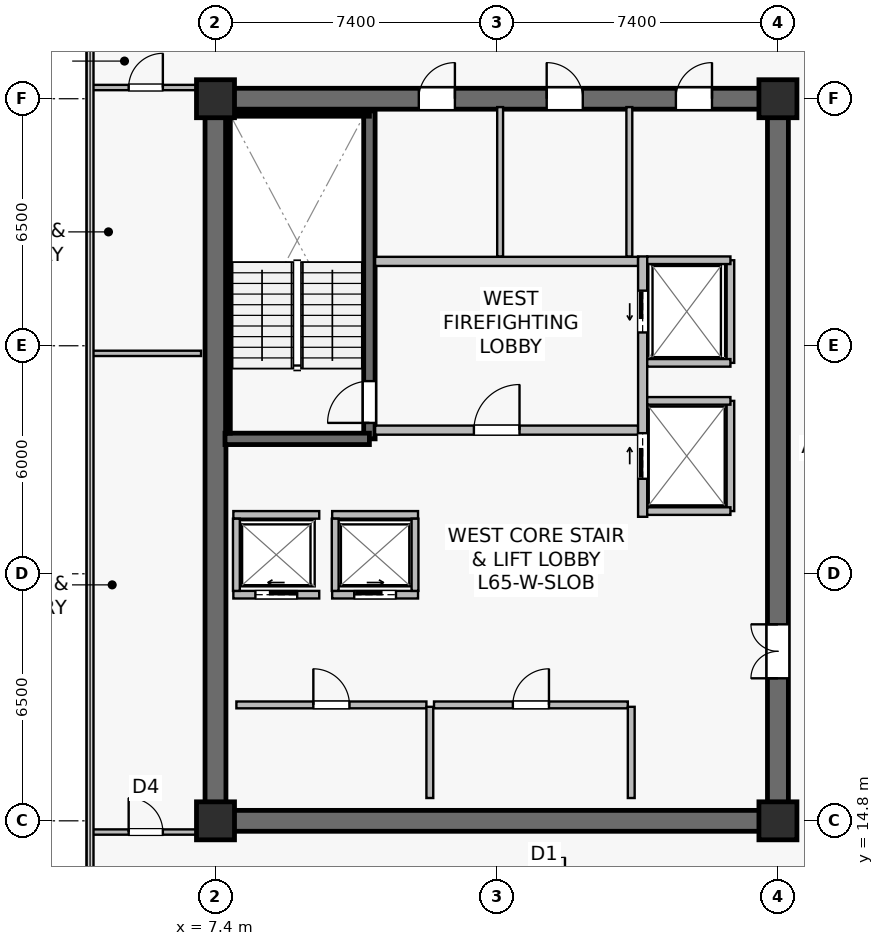
"""IFC4 building model, lengths in metres.
Left out: names, types, materials, properties, quantities, classifications, styles, units other than length and angle.
Written with IfcOpenShell. Run it as: python <this file> out.ifc"""

import sys

from ifc_helpers import new_model, si_unit, direction, frame, frame_2d, origin, origin_2d, place, context, subcontext, project, spatial, rectangle, extrude, source, transform, mapped, element, fill, save


model = new_model("IFC4")
c1 = context("Model", 3, precision=1e-05, world=origin(), true_north=direction((0.0, 1.0)))
c2 = subcontext(c1, "Body", "Model", "MODEL_VIEW")
j1 = project(units=[si_unit("LENGTHUNIT", "METRE"), si_unit("PLANEANGLEUNIT", "RADIAN")], contexts=[c1])
p1 = place(None, origin())
s1 = spatial("IfcSite", under=j1, at=p1, CompositionType="ELEMENT")
p2 = place(p1, origin())
s2 = spatial("IfcBuilding", under=s1, at=p2, CompositionType="ELEMENT")
p3 = place(p2, frame((0.0, 0.0, 271.1)))
s3 = spatial("IfcBuildingStorey", under=s2, at=p3, CompositionType="ELEMENT", Elevation=271.1)
p4 = place(p3, frame((7.125, 14.8, 0.0), z_axis=(0.0, 0.0, 1.0), x_axis=(1.0, 0.0, 0.0)))
e1 = element("IfcWall", 1, at=p4, inside=s3, PredefinedType="SHEAR", context=c2, shape_type="SweptSolid", body=[
    extrude(rectangle(XDim=15.35, YDim=0.55, at=frame_2d((7.675, 0.0))), origin(), (0.0, 0.0, 1.0), 3.8),
])
p5 = place(p3, frame((7.125, 33.8, 0.0), z_axis=(0.0, 0.0, 1.0), x_axis=(1.0, 0.0, 0.0)))
e2 = element("IfcWall", 2, at=p5, inside=s3, PredefinedType="SHEAR", context=c2, shape_type="SweptSolid", body=[
    extrude(rectangle(XDim=15.35, YDim=0.55, at=frame_2d((7.675, 0.0))), origin(), (0.0, 0.0, 1.0), 3.8),
])
p6 = place(p5, frame((5.625, 0.0, 0.0)))
e3 = element("IfcOpeningElement", 3, at=p6, cuts=e2, PredefinedType="OPENING", context=c2, shape_type="SweptSolid", body=[
    extrude(rectangle(XDim=0.95, YDim=2.15, at=frame_2d((0.475, 1.075))), frame((0.0, 0.285, 0.0), z_axis=(0.0, -1.0, 0.0), x_axis=(1.0, 0.0, 0.0)), (0.0, 0.0, 1.0), 0.57),
])
p7 = place(p5, frame((8.99, 0.0, 0.0)))
e4 = element("IfcOpeningElement", 4, at=p7, cuts=e2, PredefinedType="OPENING", context=c2, shape_type="SweptSolid", body=[
    extrude(rectangle(XDim=0.95, YDim=2.15, at=frame_2d((0.475, 1.075))), frame((0.0, 0.285, 0.0), z_axis=(0.0, -1.0, 0.0), x_axis=(1.0, 0.0, 0.0)), (0.0, 0.0, 1.0), 0.57),
])
p8 = place(p5, frame((12.39, 0.0, 0.0)))
e5 = element("IfcOpeningElement", 5, at=p8, cuts=e2, PredefinedType="OPENING", context=c2, shape_type="SweptSolid", body=[
    extrude(rectangle(XDim=0.95, YDim=2.15, at=frame_2d((0.475, 1.075))), frame((0.0, 0.285, 0.0), z_axis=(0.0, -1.0, 0.0), x_axis=(1.0, 0.0, 0.0)), (0.0, 0.0, 1.0), 0.57),
])
p9 = place(p3, frame((7.4, 15.075, 0.0), z_axis=(0.0, 0.0, 1.0), x_axis=(0.0, 1.0, 0.0)))
e6 = element("IfcWall", 6, at=p9, inside=s3, PredefinedType="SHEAR", context=c2, shape_type="SweptSolid", body=[
    extrude(rectangle(XDim=18.45, YDim=0.55, at=frame_2d((9.225, 0.0))), origin(), (0.0, 0.0, 1.0), 3.8),
])
p10 = place(p3, frame((22.2, 15.075, 0.0), z_axis=(0.0, 0.0, 1.0), x_axis=(0.0, 1.0, 0.0)))
e7 = element("IfcWall", 7, at=p10, inside=s3, PredefinedType="SHEAR", context=c2, shape_type="SweptSolid", body=[
    extrude(rectangle(XDim=18.45, YDim=0.55, at=frame_2d((9.225, 0.0))), origin(), (0.0, 0.0, 1.0), 3.8),
])
p11 = place(p10, frame((3.475, 0.0, 0.0)))
e8 = element("IfcOpeningElement", 8, at=p11, cuts=e7, PredefinedType="OPENING", context=c2, shape_type="SweptSolid", body=[
    extrude(rectangle(XDim=1.42, YDim=2.2, at=frame_2d((0.71, 1.1))), frame((0.0, 0.285, 0.0), z_axis=(0.0, -1.0, 0.0), x_axis=(1.0, 0.0, 0.0)), (0.0, 0.0, 1.0), 0.57),
])
p12 = place(p3, frame((11.45, 24.85, 0.0), z_axis=(0.0, 0.0, 1.0), x_axis=(0.0, 1.0, 0.0)))
e9 = element("IfcWall", 9, at=p12, inside=s3, PredefinedType="SHEAR", context=c2, shape_type="SweptSolid", body=[
    extrude(rectangle(XDim=8.63, YDim=0.3, at=frame_2d((4.315, 0.0))), origin(), (0.0, 0.0, 1.0), 3.8),
])
p13 = place(p12, frame((0.42, 0.0, 0.0)))
e10 = element("IfcOpeningElement", 10, at=p13, cuts=e9, PredefinedType="OPENING", context=c2, shape_type="SweptSolid", body=[
    extrude(rectangle(XDim=1.1, YDim=2.15, at=frame_2d((0.55, 1.075))), frame((0.0, 0.16, 0.0), z_axis=(0.0, -1.0, 0.0), x_axis=(1.0, 0.0, 0.0)), (0.0, 0.0, 1.0), 0.32),
])
p14 = place(p3, frame((7.65, 24.85, 0.0), z_axis=(0.0, 0.0, 1.0), x_axis=(1.0, 0.0, 0.0)))
e11 = element("IfcWall", 11, at=p14, inside=s3, PredefinedType="SHEAR", context=c2, shape_type="SweptSolid", body=[
    extrude(rectangle(XDim=3.8, YDim=0.3, at=frame_2d((1.9, 0.0))), origin(), (0.0, 0.0, 1.0), 3.8),
])
p15 = place(p3, frame((7.73, 33.4, 0.0), z_axis=(0.0, 0.0, 1.0), x_axis=(1.0, 0.0, 0.0)))
e12 = element("IfcWall", 12, at=p15, inside=s3, PredefinedType="SOLIDWALL", context=c2, shape_type="SweptSolid", body=[
    extrude(rectangle(XDim=3.72, YDim=0.12, at=frame_2d((1.86, 0.0))), origin(), (0.0, 0.0, 1.0), 3.8),
])
p16 = place(p3, frame((7.73, 25.0, 0.0), z_axis=(0.0, 0.0, 1.0), x_axis=(0.0, 1.0, 0.0)))
e13 = element("IfcWall", 13, at=p16, inside=s3, PredefinedType="SOLIDWALL", context=c2, shape_type="SweptSolid", body=[
    extrude(rectangle(XDim=8.32, YDim=0.12, at=frame_2d((4.16, 0.0))), origin(), (0.0, 0.0, 1.0), 3.8),
])
m1 = source(origin(), c2, "Body", "SweptSolid", [
    extrude(rectangle(XDim=1.0, YDim=1.0, at=origin_2d()), origin(), (0.0, 0.0, 1.0), 4.1),
])
for number, where, z_axis, x_axis in (
    (14, (7.4, 14.8, 0.0), (0.0, 0.0, 1.0), (1.0, 0.0, 0.0)),
    (15, (22.2, 14.8, 0.0), (0.0, 0.0, 1.0), (1.0, 0.0, 0.0)),
    (16, (7.4, 33.8, 0.0), (0.0, 0.0, 1.0), (1.0, 0.0, 0.0)),
    (17, (22.2, 33.8, 0.0), (0.0, 0.0, 1.0), (1.0, 0.0, 0.0)),
):
    element("IfcColumn", number, at=place(p3, frame(where, z_axis=z_axis, x_axis=x_axis)), inside=s3, PredefinedType="COLUMN", context=c2, shape_type="MappedRepresentation", body=[
        mapped(m1, transform((0.0, 0.0, 0.0), scale=1.0)),
    ])
p17 = place(p3, frame((11.6, 25.08, 0.0), z_axis=(0.0, 0.0, 1.0), x_axis=(1.0, 0.0, 0.0)))
e18 = element("IfcWall", 18, at=p17, inside=s3, PredefinedType="SOLIDWALL", context=c2, shape_type="SweptSolid", body=[
    extrude(rectangle(XDim=6.92, YDim=0.24, at=frame_2d((3.46, 0.0))), origin(), (0.0, 0.0, 1.0), 3.197),
])
p18 = place(p17, frame((2.6, 0.0, 0.0)))
e19 = element("IfcOpeningElement", 19, at=p18, cuts=e18, PredefinedType="OPENING", context=c2, shape_type="SweptSolid", body=[
    extrude(rectangle(XDim=1.2, YDim=2.16, at=frame_2d((0.6, 1.08))), frame((0.0, 0.13, 0.0), z_axis=(0.0, -1.0, 0.0), x_axis=(1.0, 0.0, 0.0)), (0.0, 0.0, 1.0), 0.26),
])
p19 = place(p3, frame((11.6, 29.52, 0.0), z_axis=(0.0, 0.0, 1.0), x_axis=(1.0, 0.0, 0.0)))
e20 = element("IfcWall", 20, at=p19, inside=s3, PredefinedType="SOLIDWALL", context=c2, shape_type="SweptSolid", body=[
    extrude(rectangle(XDim=6.92, YDim=0.24, at=frame_2d((3.46, 0.0))), origin(), (0.0, 0.0, 1.0), 3.197),
])
p20 = place(p3, frame((18.64, 22.8, 0.0), z_axis=(0.0, 0.0, 1.0), x_axis=(0.0, 1.0, 0.0)))
e21 = element("IfcWall", 21, at=p20, inside=s3, PredefinedType="SOLIDWALL", context=c2, shape_type="SweptSolid", body=[
    extrude(rectangle(XDim=6.85, YDim=0.24, at=frame_2d((3.425, 0.0))), origin(), (0.0, 0.0, 1.0), 2.935),
])
p21 = place(p20, frame((4.85, 0.0, 0.0)))
e22 = element("IfcOpeningElement", 22, at=p21, cuts=e21, PredefinedType="OPENING", context=c2, shape_type="SweptSolid", body=[
    extrude(rectangle(XDim=1.1, YDim=2.22, at=frame_2d((0.55, 1.11))), frame((0.0, 0.13, 0.0), z_axis=(0.0, -1.0, 0.0), x_axis=(1.0, 0.0, 0.0)), (0.0, 0.0, 1.0), 0.26),
])
p22 = place(p20, frame((1.0, 0.0, 0.0)))
e23 = element("IfcOpeningElement", 23, at=p22, cuts=e21, PredefinedType="OPENING", context=c2, shape_type="SweptSolid", body=[
    extrude(rectangle(XDim=1.2, YDim=2.22, at=frame_2d((0.6, 1.11))), frame((0.0, 0.13, 0.0), z_axis=(0.0, -1.0, 0.0), x_axis=(1.0, 0.0, 0.0)), (0.0, 0.0, 1.0), 0.26),
])
p23 = place(p3, frame((7.87, 20.75, 0.0), z_axis=(0.0, 0.0, 1.0), x_axis=(1.0, 0.0, 0.0)))
e24 = element("IfcWall", 24, at=p23, inside=s3, PredefinedType="SOLIDWALL", context=c2, shape_type="SweptSolid", body=[
    extrude(rectangle(XDim=2.26, YDim=0.2, at=frame_2d((1.13, 0.0))), origin(), (0.0, 0.0, 1.0), 3.8),
])
p24 = place(p23, frame((0.58, 0.0, 0.0)))
e25 = element("IfcOpeningElement", 25, at=p24, cuts=e24, PredefinedType="OPENING", context=c2, shape_type="SweptSolid", body=[
    extrude(rectangle(XDim=1.1, YDim=2.22, at=frame_2d((0.55, 1.11))), frame((0.0, 0.11, 0.0), z_axis=(0.0, -1.0, 0.0), x_axis=(1.0, 0.0, 0.0)), (0.0, 0.0, 1.0), 0.22),
])
p25 = place(p3, frame((7.87, 22.85, 0.0), z_axis=(0.0, 0.0, 1.0), x_axis=(1.0, 0.0, 0.0)))
e26 = element("IfcWall", 26, at=p25, inside=s3, PredefinedType="SOLIDWALL", context=c2, shape_type="SweptSolid", body=[
    extrude(rectangle(XDim=2.26, YDim=0.2, at=frame_2d((1.13, 0.0))), origin(), (0.0, 0.0, 1.0), 3.8),
])
p26 = place(p3, frame((7.95, 20.85, 0.0), z_axis=(0.0, 0.0, 1.0), x_axis=(0.0, 1.0, 0.0)))
e27 = element("IfcWall", 27, at=p26, inside=s3, PredefinedType="SOLIDWALL", context=c2, shape_type="SweptSolid", body=[
    extrude(rectangle(XDim=1.9, YDim=0.18, at=frame_2d((0.95, 0.0))), origin(), (0.0, 0.0, 1.0), 3.8),
])
p27 = place(p3, frame((10.47, 20.75, 0.0), z_axis=(0.0, 0.0, 1.0), x_axis=(1.0, 0.0, 0.0)))
e28 = element("IfcWall", 28, at=p27, inside=s3, PredefinedType="SOLIDWALL", context=c2, shape_type="SweptSolid", body=[
    extrude(rectangle(XDim=2.26, YDim=0.2, at=frame_2d((1.13, 0.0))), origin(), (0.0, 0.0, 1.0), 3.8),
])
p28 = place(p27, frame((0.58, 0.0, 0.0)))
e29 = element("IfcOpeningElement", 29, at=p28, cuts=e28, PredefinedType="OPENING", context=c2, shape_type="SweptSolid", body=[
    extrude(rectangle(XDim=1.1, YDim=2.22, at=frame_2d((0.55, 1.11))), frame((0.0, 0.11, 0.0), z_axis=(0.0, -1.0, 0.0), x_axis=(1.0, 0.0, 0.0)), (0.0, 0.0, 1.0), 0.22),
])
p29 = place(p3, frame((10.47, 22.85, 0.0), z_axis=(0.0, 0.0, 1.0), x_axis=(1.0, 0.0, 0.0)))
e30 = element("IfcWall", 30, at=p29, inside=s3, PredefinedType="SOLIDWALL", context=c2, shape_type="SweptSolid", body=[
    extrude(rectangle(XDim=2.26, YDim=0.2, at=frame_2d((1.13, 0.0))), origin(), (0.0, 0.0, 1.0), 3.8),
])
for number, where, z_axis, x_axis in (
    (31, (10.55, 20.85, 0.0), (0.0, 0.0, 1.0), (0.0, 1.0, 0.0)),
    (32, (12.65, 20.85, 0.0), (0.0, 0.0, 1.0), (0.0, 1.0, 0.0)),
):
    element("IfcWall", number, at=place(p3, frame(where, z_axis=z_axis, x_axis=x_axis)), inside=s3, PredefinedType="SOLIDWALL", context=c2, shape_type="SweptSolid", body=[
        extrude(rectangle(XDim=1.9, YDim=0.18, at=frame_2d((0.95, 0.0))), origin(), (0.0, 0.0, 1.0), 3.8),
    ])
p30 = place(p3, frame((20.95, 26.85, 0.0), z_axis=(0.0, 0.0, 1.0), x_axis=(0.0, 1.0, 0.0)))
e33 = element("IfcWall", 33, at=p30, inside=s3, PredefinedType="SOLIDWALL", context=c2, shape_type="SweptSolid", body=[
    extrude(rectangle(XDim=2.7, YDim=0.2, at=frame_2d((1.35, 0.0))), origin(), (0.0, 0.0, 1.0), 3.8),
])
p31 = place(p3, frame((18.76, 29.55, 0.0), z_axis=(0.0, 0.0, 1.0), x_axis=(1.0, 0.0, 0.0)))
e34 = element("IfcWall", 34, at=p31, inside=s3, PredefinedType="SOLIDWALL", context=c2, shape_type="SweptSolid", body=[
    extrude(rectangle(XDim=2.19, YDim=0.2, at=frame_2d((1.095, 0.0))), origin(), (0.0, 0.0, 1.0), 3.8),
])
p32 = place(p3, frame((18.76, 26.85, 0.0), z_axis=(0.0, 0.0, 1.0), x_axis=(1.0, 0.0, 0.0)))
e35 = element("IfcWall", 35, at=p32, inside=s3, PredefinedType="SOLIDWALL", context=c2, shape_type="SweptSolid", body=[
    extrude(rectangle(XDim=2.19, YDim=0.2, at=frame_2d((1.095, 0.0))), origin(), (0.0, 0.0, 1.0), 3.197),
])
p33 = place(p3, frame((20.95, 22.95, 0.0), z_axis=(0.0, 0.0, 1.0), x_axis=(0.0, 1.0, 0.0)))
e36 = element("IfcWall", 36, at=p33, inside=s3, PredefinedType="SOLIDWALL", context=c2, shape_type="SweptSolid", body=[
    extrude(rectangle(XDim=2.9, YDim=0.2, at=frame_2d((1.45, 0.0))), origin(), (0.0, 0.0, 1.0), 2.935),
])
for number, where, z_axis, x_axis in (
    (37, (18.76, 25.85, 0.0), (0.0, 0.0, 1.0), (1.0, 0.0, 0.0)),
    (38, (18.76, 22.95, 0.0), (0.0, 0.0, 1.0), (1.0, 0.0, 0.0)),
):
    element("IfcWall", number, at=place(p3, frame(where, z_axis=z_axis, x_axis=x_axis)), inside=s3, PredefinedType="SOLIDWALL", context=c2, shape_type="SweptSolid", body=[
        extrude(rectangle(XDim=2.19, YDim=0.2, at=frame_2d((1.095, 0.0))), origin(), (0.0, 0.0, 1.0), 3.8),
    ])
p34 = place(p3, frame((7.95, 17.85, 0.0), z_axis=(0.0, 0.0, 1.0), x_axis=(1.0, 0.0, 0.0)))
e39 = element("IfcWall", 39, at=p34, inside=s3, PredefinedType="SOLIDWALL", context=c2, shape_type="SweptSolid", body=[
    extrude(rectangle(XDim=5.0, YDim=0.18, at=frame_2d((2.5, 0.0))), origin(), (0.0, 0.0, 1.0), 3.8),
])
p35 = place(p34, frame((2.025, 0.0, 0.0)))
e40 = element("IfcOpeningElement", 40, at=p35, cuts=e39, PredefinedType="OPENING", context=c2, shape_type="SweptSolid", body=[
    extrude(rectangle(XDim=0.95, YDim=2.15, at=frame_2d((0.475, 1.075))), frame((0.0, 0.1, 0.0), z_axis=(0.0, -1.0, 0.0), x_axis=(1.0, 0.0, 0.0)), (0.0, 0.0, 1.0), 0.2),
])
p36 = place(p3, frame((13.04, 15.4, 0.0), z_axis=(0.0, 0.0, 1.0), x_axis=(0.0, 1.0, 0.0)))
e41 = element("IfcWall", 41, at=p36, inside=s3, PredefinedType="SOLIDWALL", context=c2, shape_type="SweptSolid", body=[
    extrude(rectangle(XDim=2.4, YDim=0.18, at=frame_2d((1.2, 0.0))), origin(), (0.0, 0.0, 1.0), 3.8),
])
p37 = place(p3, frame((13.15, 17.85, 0.0), z_axis=(0.0, 0.0, 1.0), x_axis=(1.0, 0.0, 0.0)))
e42 = element("IfcWall", 42, at=p37, inside=s3, PredefinedType="SOLIDWALL", context=c2, shape_type="SweptSolid", body=[
    extrude(rectangle(XDim=5.1, YDim=0.18, at=frame_2d((2.55, 0.0))), origin(), (0.0, 0.0, 1.0), 3.197),
])
p38 = place(p37, frame((2.075, 0.0, 0.0)))
e43 = element("IfcOpeningElement", 43, at=p38, cuts=e42, PredefinedType="OPENING", context=c2, shape_type="SweptSolid", body=[
    extrude(rectangle(XDim=0.95, YDim=2.15, at=frame_2d((0.475, 1.075))), frame((0.0, 0.1, 0.0), z_axis=(0.0, -1.0, 0.0), x_axis=(1.0, 0.0, 0.0)), (0.0, 0.0, 1.0), 0.2),
])
p39 = place(p3, frame((18.34, 15.4, 0.0), z_axis=(0.0, 0.0, 1.0), x_axis=(0.0, 1.0, 0.0)))
e44 = element("IfcWall", 44, at=p39, inside=s3, PredefinedType="SOLIDWALL", context=c2, shape_type="SweptSolid", body=[
    extrude(rectangle(XDim=2.4, YDim=0.18, at=frame_2d((1.2, 0.0))), origin(), (0.0, 0.0, 1.0), 3.8),
])
p40 = place(p3, frame((14.89, 29.65, 0.0), z_axis=(0.0, 0.0, 1.0), x_axis=(0.0, 1.0, 0.0)))
e45 = element("IfcWall", 45, at=p40, inside=s3, PredefinedType="PLUMBINGWALL", context=c2, shape_type="SweptSolid", body=[
    extrude(rectangle(XDim=3.93, YDim=0.155, at=frame_2d((1.965, 0.0))), origin(), (0.0, 0.0, 1.0), 3.197),
])
p41 = place(p3, frame((18.29, 29.65, 0.0), z_axis=(0.0, 0.0, 1.0), x_axis=(0.0, 1.0, 0.0)))
e46 = element("IfcWall", 46, at=p41, inside=s3, PredefinedType="PLUMBINGWALL", context=c2, shape_type="SweptSolid", body=[
    extrude(rectangle(XDim=3.93, YDim=0.155, at=frame_2d((1.965, 0.0))), origin(), (0.0, 0.0, 1.0), 3.8),
])
p42 = place(p3, frame((4.11, 27.1, 0.0), z_axis=(0.0, 0.0, 1.0), x_axis=(1.0, 0.0, 0.0)))
e47 = element("IfcWall", 47, at=p42, inside=s3, PredefinedType="PARTITIONING", context=c2, shape_type="SweptSolid", body=[
    extrude(rectangle(XDim=2.91, YDim=0.14, at=frame_2d((1.455, 0.0))), origin(), (0.0, 0.0, 1.0), 3.8),
])
p43 = place(p3, frame((4.11, 14.505, 0.0), z_axis=(0.0, 0.0, 1.0), x_axis=(1.0, 0.0, 0.0)))
e48 = element("IfcWall", 48, at=p43, inside=s3, PredefinedType="PARTITIONING", context=c2, shape_type="SweptSolid", body=[
    extrude(rectangle(XDim=2.91, YDim=0.14, at=frame_2d((1.455, 0.0))), origin(), (0.0, 0.0, 1.0), 3.8),
])
p44 = place(p43, frame((1.005, 0.0, 0.0)))
e49 = element("IfcOpeningElement", 49, at=p44, cuts=e48, PredefinedType="OPENING", context=c2, shape_type="SweptSolid", body=[
    extrude(rectangle(XDim=0.9, YDim=2.1, at=frame_2d((0.45, 1.05))), frame((0.0, 0.08, 0.0), z_axis=(0.0, -1.0, 0.0), x_axis=(1.0, 0.0, 0.0)), (0.0, 0.0, 1.0), 0.16),
])
p45 = place(p3, frame((4.11, 34.095, 0.0), z_axis=(0.0, 0.0, 1.0), x_axis=(1.0, 0.0, 0.0)))
e50 = element("IfcWall", 50, at=p45, inside=s3, PredefinedType="PARTITIONING", context=c2, shape_type="SweptSolid", body=[
    extrude(rectangle(XDim=2.91, YDim=0.14, at=frame_2d((1.455, 0.0))), origin(), (0.0, 0.0, 1.0), 3.8),
])
p46 = place(p45, frame((1.005, 0.0, 0.0)))
e51 = element("IfcOpeningElement", 51, at=p46, cuts=e50, PredefinedType="OPENING", context=c2, shape_type="SweptSolid", body=[
    extrude(rectangle(XDim=0.9, YDim=2.1, at=frame_2d((0.45, 1.05))), frame((0.0, 0.08, 0.0), z_axis=(0.0, -1.0, 0.0), x_axis=(1.0, 0.0, 0.0)), (0.0, 0.0, 1.0), 0.16),
])
m2 = source(origin(), c2, "Body", "SweptSolid", [
    extrude(rectangle(XDim=1.1, YDim=2.15, at=frame_2d((0.55, 1.075))), frame((0.0, 0.025, 0.0), z_axis=(0.0, -1.0, 0.0), x_axis=(1.0, 0.0, 0.0)), (0.0, 0.0, 1.0), 0.05),
])
p47 = place(p13, origin())
e52 = element("IfcDoor", 52, at=p47, inside=s3, OperationType="SINGLE_SWING_LEFT", PredefinedType="DOOR", context=c2, shape_type="MappedRepresentation", body=[
    mapped(m2, transform((0.0, 0.0, 0.0), scale=1.0)),
])
fill(e10, e52)
m3 = source(origin(), c2, "Body", "SweptSolid", [
    extrude(rectangle(XDim=1.2, YDim=2.16, at=frame_2d((0.6, 1.08))), frame((0.0, 0.025, 0.0), z_axis=(0.0, -1.0, 0.0), x_axis=(1.0, 0.0, 0.0)), (0.0, 0.0, 1.0), 0.05),
])
p48 = place(p18, origin())
e53 = element("IfcDoor", 53, at=p48, inside=s3, OperationType="SINGLE_SWING_RIGHT", PredefinedType="DOOR", context=c2, shape_type="MappedRepresentation", body=[
    mapped(m3, transform((0.0, 0.0, 0.0), scale=1.0)),
])
fill(e19, e53)
m4 = source(origin(), c2, "Body", "SweptSolid", [
    extrude(rectangle(XDim=1.1, YDim=2.22, at=frame_2d((0.55, 1.11))), frame((0.0, 0.025, 0.0), z_axis=(0.0, -1.0, 0.0), x_axis=(1.0, 0.0, 0.0)), (0.0, 0.0, 1.0), 0.05),
])
p49 = place(p24, origin())
e54 = element("IfcDoor", 54, at=p49, inside=s3, OperationType="SLIDING_TO_LEFT", PredefinedType="USERDEFINED", context=c2, shape_type="MappedRepresentation", body=[
    mapped(m4, transform((0.0, 0.0, 0.0), scale=1.0)),
])
fill(e25, e54)
p50 = place(p28, origin())
e55 = element("IfcDoor", 55, at=p50, inside=s3, OperationType="SLIDING_TO_RIGHT", PredefinedType="USERDEFINED", context=c2, shape_type="MappedRepresentation", body=[
    mapped(m4, transform((0.0, 0.0, 0.0), scale=1.0)),
])
fill(e29, e55)
p51 = place(p21, origin())
e56 = element("IfcDoor", 56, at=p51, inside=s3, OperationType="SLIDING_TO_LEFT", PredefinedType="USERDEFINED", context=c2, shape_type="MappedRepresentation", body=[
    mapped(m4, transform((0.0, 0.0, 0.0), scale=1.0)),
])
fill(e22, e56)
m5 = source(origin(), c2, "Body", "SweptSolid", [
    extrude(rectangle(XDim=1.2, YDim=2.22, at=frame_2d((0.6, 1.11))), frame((0.0, 0.025, 0.0), z_axis=(0.0, -1.0, 0.0), x_axis=(1.0, 0.0, 0.0)), (0.0, 0.0, 1.0), 0.05),
])
p52 = place(p22, origin())
e57 = element("IfcDoor", 57, at=p52, inside=s3, OperationType="SLIDING_TO_RIGHT", PredefinedType="USERDEFINED", context=c2, shape_type="MappedRepresentation", body=[
    mapped(m5, transform((0.0, 0.0, 0.0), scale=1.0)),
])
fill(e23, e57)
m6 = source(origin(), c2, "Body", "SweptSolid", [
    extrude(rectangle(XDim=0.95, YDim=2.15, at=frame_2d((0.475, 1.075))), frame((0.0, 0.025, 0.0), z_axis=(0.0, -1.0, 0.0), x_axis=(1.0, 0.0, 0.0)), (0.0, 0.0, 1.0), 0.05),
])
p53 = place(p35, origin())
e58 = element("IfcDoor", 58, at=p53, inside=s3, OperationType="SINGLE_SWING_LEFT", PredefinedType="DOOR", context=c2, shape_type="MappedRepresentation", body=[
    mapped(m6, transform((0.0, 0.0, 0.0), scale=1.0)),
])
fill(e40, e58)
p54 = place(p38, origin())
e59 = element("IfcDoor", 59, at=p54, inside=s3, OperationType="SINGLE_SWING_RIGHT", PredefinedType="DOOR", context=c2, shape_type="MappedRepresentation", body=[
    mapped(m6, transform((0.0, 0.0, 0.0), scale=1.0)),
])
fill(e43, e59)
m7 = source(origin(), c2, "Body", "SweptSolid", [
    extrude(rectangle(XDim=1.42, YDim=2.2, at=frame_2d((0.71, 1.1))), frame((0.0, 0.025, 0.0), z_axis=(0.0, -1.0, 0.0), x_axis=(1.0, 0.0, 0.0)), (0.0, 0.0, 1.0), 0.05),
])
p55 = place(p11, origin())
e60 = element("IfcDoor", 60, at=p55, inside=s3, OperationType="DOUBLE_DOOR_SINGLE_SWING", PredefinedType="DOOR", context=c2, shape_type="MappedRepresentation", body=[
    mapped(m7, transform((0.0, 0.0, 0.0), scale=1.0)),
])
fill(e8, e60)
p56 = place(p6, origin())
e61 = element("IfcDoor", 61, at=p56, inside=s3, OperationType="SINGLE_SWING_RIGHT", PredefinedType="DOOR", context=c2, shape_type="MappedRepresentation", body=[
    mapped(m6, transform((0.0, 0.0, 0.0), scale=1.0)),
])
fill(e3, e61)
p57 = place(p7, origin())
e62 = element("IfcDoor", 62, at=p57, inside=s3, OperationType="SINGLE_SWING_LEFT", PredefinedType="DOOR", context=c2, shape_type="MappedRepresentation", body=[
    mapped(m6, transform((0.0, 0.0, 0.0), scale=1.0)),
])
fill(e4, e62)
p58 = place(p8, origin())
e63 = element("IfcDoor", 63, at=p58, inside=s3, OperationType="SINGLE_SWING_RIGHT", PredefinedType="DOOR", context=c2, shape_type="MappedRepresentation", body=[
    mapped(m6, transform((0.0, 0.0, 0.0), scale=1.0)),
])
fill(e5, e63)
m8 = source(origin(), c2, "Body", "SweptSolid", [
    extrude(rectangle(XDim=0.9, YDim=2.1, at=frame_2d((0.45, 1.05))), frame((0.0, 0.025, 0.0), z_axis=(0.0, -1.0, 0.0), x_axis=(1.0, 0.0, 0.0)), (0.0, 0.0, 1.0), 0.05),
])
p59 = place(p44, origin())
e64 = element("IfcDoor", 64, at=p59, inside=s3, OperationType="SINGLE_SWING_LEFT", PredefinedType="DOOR", context=c2, shape_type="MappedRepresentation", body=[
    mapped(m8, transform((0.0, 0.0, 0.0), scale=1.0)),
])
fill(e49, e64)
p60 = place(p46, origin())
e65 = element("IfcDoor", 65, at=p60, inside=s3, OperationType="SINGLE_SWING_RIGHT", PredefinedType="DOOR", context=c2, shape_type="MappedRepresentation", body=[
    mapped(m8, transform((0.0, 0.0, 0.0), scale=1.0)),
])
fill(e51, e65)
save(model, sys.argv[1])
